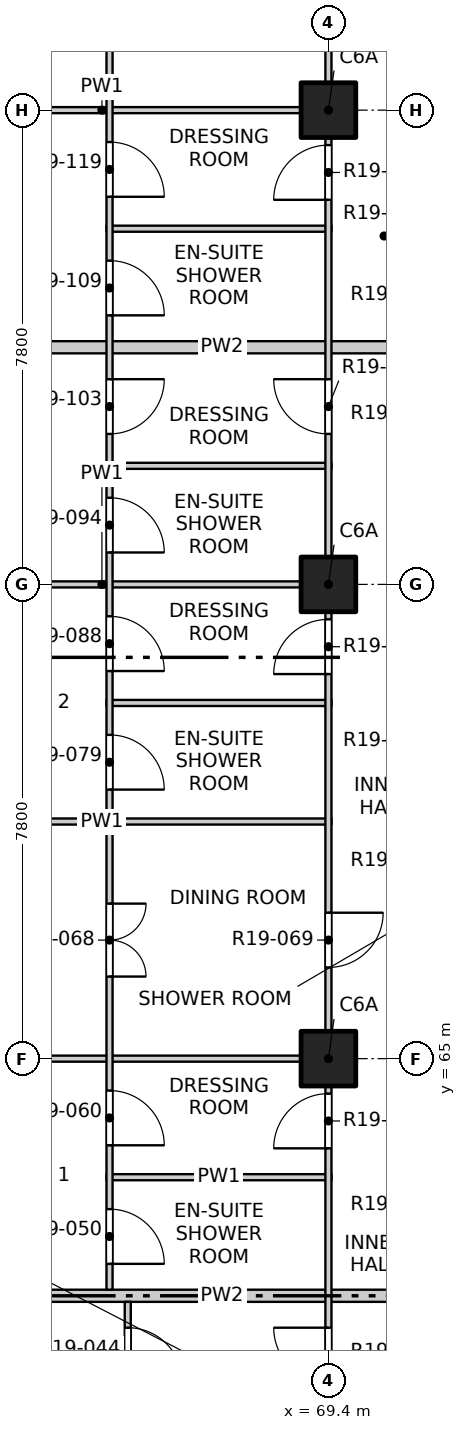
"""IFC4 building model, lengths in metres.
Left out: names, types, materials, properties, quantities, classifications, styles, units other than length and angle.
Written with IfcOpenShell. Run it as: python <this file> out.ifc"""

import sys

from ifc_helpers import new_model, si_unit, direction, frame, frame_2d, origin, origin_2d, place, context, subcontext, project, spatial, rectangle, extrude, element, fill, save


model = new_model("IFC4")
c1 = context("Model", 3, precision=1e-05, world=origin(), true_north=direction((0.0, 1.0)))
c2 = subcontext(c1, "Body", "Model", "MODEL_VIEW")
j1 = project(units=[si_unit("LENGTHUNIT", "METRE"), si_unit("PLANEANGLEUNIT", "RADIAN")], contexts=[c1])
p1 = place(None, origin())
s1 = spatial("IfcSite", under=j1, at=p1, CompositionType="ELEMENT")
p2 = place(p1, origin())
s2 = spatial("IfcBuilding", under=s1, at=p2, CompositionType="ELEMENT")
p3 = place(p2, frame((0.0, 0.0, 197.3)))
s3 = spatial("IfcBuildingStorey", under=s2, at=p3, CompositionType="ELEMENT", Elevation=197.3)
for number, where, z_axis, x_axis in (
    (1, (69.4, 65.0, -0.3), (0.0, 0.0, 1.0), (1.0, 0.0, 0.0)),
    (2, (69.4, 72.8, -0.3), (0.0, 0.0, 1.0), (1.0, 0.0, 0.0)),
    (3, (69.4, 80.6, -0.3), (0.0, 0.0, 1.0), (1.0, 0.0, 0.0)),
):
    element("IfcColumn", number, at=place(p3, frame(where, z_axis=z_axis, x_axis=x_axis)), inside=s3, PredefinedType="COLUMN", context=c2, shape_type="SweptSolid", body=[
        extrude(rectangle(XDim=0.9, YDim=0.9, at=origin_2d()), origin(), (0.0, 0.0, 1.0), 3.45),
    ])
p4 = place(p3, frame((61.9, 61.1, 0.0), z_axis=(0.0, 0.0, 1.0), x_axis=(1.0, 0.0, 0.0)))
e4 = element("IfcWall", 4, at=p4, inside=s3, PredefinedType="PARTITIONING", context=c2, shape_type="SweptSolid", body=[
    extrude(rectangle(XDim=11.5, YDim=0.2, at=frame_2d((5.75, 0.0))), origin(), (0.0, 0.0, 1.0), 2.55),
])
p5 = place(p3, frame((65.75, 63.05, 0.0), z_axis=(0.0, 0.0, 1.0), x_axis=(1.0, 0.0, 0.0)))
e5 = element("IfcWall", 5, at=p5, inside=s3, PredefinedType="PARTITIONING", context=c2, shape_type="SweptSolid", body=[
    extrude(rectangle(XDim=3.7, YDim=0.1, at=frame_2d((1.85, 0.0))), origin(), (0.0, 0.0, 1.0), 3.15),
])
p6 = place(p3, frame((61.9, 65.0, 0.0), z_axis=(0.0, 0.0, 1.0), x_axis=(1.0, 0.0, 0.0)))
e6 = element("IfcWall", 6, at=p6, inside=s3, PredefinedType="PARTITIONING", context=c2, shape_type="SweptSolid", body=[
    extrude(rectangle(XDim=7.55, YDim=0.1, at=frame_2d((3.775, 0.0))), origin(), (0.0, 0.0, 1.0), 3.15),
])
p7 = place(p3, frame((61.9, 68.9, 0.0), z_axis=(0.0, 0.0, 1.0), x_axis=(1.0, 0.0, 0.0)))
e7 = element("IfcWall", 7, at=p7, inside=s3, PredefinedType="PARTITIONING", context=c2, shape_type="SweptSolid", body=[
    extrude(rectangle(XDim=7.55, YDim=0.1, at=frame_2d((3.775, 0.0))), origin(), (0.0, 0.0, 1.0), 2.55),
])
p8 = place(p3, frame((65.75, 70.85, 0.0), z_axis=(0.0, 0.0, 1.0), x_axis=(1.0, 0.0, 0.0)))
e8 = element("IfcWall", 8, at=p8, inside=s3, PredefinedType="PARTITIONING", context=c2, shape_type="SweptSolid", body=[
    extrude(rectangle(XDim=3.7, YDim=0.1, at=frame_2d((1.85, 0.0))), origin(), (0.0, 0.0, 1.0), 3.15),
])
p9 = place(p3, frame((61.9, 72.8, 0.0), z_axis=(0.0, 0.0, 1.0), x_axis=(1.0, 0.0, 0.0)))
e9 = element("IfcWall", 9, at=p9, inside=s3, PredefinedType="PARTITIONING", context=c2, shape_type="SweptSolid", body=[
    extrude(rectangle(XDim=7.55, YDim=0.1, at=frame_2d((3.775, 0.0))), origin(), (0.0, 0.0, 1.0), 3.15),
])
p10 = place(p3, frame((65.75, 74.75, 0.0), z_axis=(0.0, 0.0, 1.0), x_axis=(1.0, 0.0, 0.0)))
e10 = element("IfcWall", 10, at=p10, inside=s3, PredefinedType="PARTITIONING", context=c2, shape_type="SweptSolid", body=[
    extrude(rectangle(XDim=3.7, YDim=0.1, at=frame_2d((1.85, 0.0))), origin(), (0.0, 0.0, 1.0), 3.15),
])
p11 = place(p3, frame((61.9, 76.7, 0.0), z_axis=(0.0, 0.0, 1.0), x_axis=(1.0, 0.0, 0.0)))
e11 = element("IfcWall", 11, at=p11, inside=s3, PredefinedType="PARTITIONING", context=c2, shape_type="SweptSolid", body=[
    extrude(rectangle(XDim=11.5, YDim=0.2, at=frame_2d((5.75, 0.0))), origin(), (0.0, 0.0, 1.0), 2.55),
])
p12 = place(p3, frame((65.75, 78.65, 0.0), z_axis=(0.0, 0.0, 1.0), x_axis=(1.0, 0.0, 0.0)))
e12 = element("IfcWall", 12, at=p12, inside=s3, PredefinedType="PARTITIONING", context=c2, shape_type="SweptSolid", body=[
    extrude(rectangle(XDim=3.7, YDim=0.1, at=frame_2d((1.85, 0.0))), origin(), (0.0, 0.0, 1.0), 3.15),
])
p13 = place(p3, frame((61.9, 80.6, 0.0), z_axis=(0.0, 0.0, 1.0), x_axis=(1.0, 0.0, 0.0)))
e13 = element("IfcWall", 13, at=p13, inside=s3, PredefinedType="PARTITIONING", context=c2, shape_type="SweptSolid", body=[
    extrude(rectangle(XDim=7.55, YDim=0.1, at=frame_2d((3.775, 0.0))), origin(), (0.0, 0.0, 1.0), 3.15),
])
p14 = place(p3, frame((65.8, 61.2, 0.0), z_axis=(0.0, 0.0, 1.0), x_axis=(0.0, 1.0, 0.0)))
e14 = element("IfcWall", 14, at=p14, inside=s3, PredefinedType="PARTITIONING", context=c2, shape_type="SweptSolid", body=[
    extrude(rectangle(XDim=26.9, YDim=0.1, at=frame_2d((13.45, 0.0))), origin(), (0.0, 0.0, 1.0), 3.15),
])
p15 = place(p14, frame((0.425, 0.0, 0.0)))
e15 = element("IfcOpeningElement", 15, at=p15, cuts=e14, PredefinedType="OPENING", context=c2, shape_type="SweptSolid", body=[
    extrude(rectangle(XDim=0.9, YDim=2.1, at=frame_2d((0.45, 1.05))), frame((0.0, 0.06, 0.0), z_axis=(0.0, -1.0, 0.0), x_axis=(1.0, 0.0, 0.0)), (0.0, 0.0, 1.0), 0.12),
])
p16 = place(p14, frame((2.375, 0.0, 0.0)))
e16 = element("IfcOpeningElement", 16, at=p16, cuts=e14, PredefinedType="OPENING", context=c2, shape_type="SweptSolid", body=[
    extrude(rectangle(XDim=0.9, YDim=2.1, at=frame_2d((0.45, 1.05))), frame((0.0, 0.06, 0.0), z_axis=(0.0, -1.0, 0.0), x_axis=(1.0, 0.0, 0.0)), (0.0, 0.0, 1.0), 0.12),
])
p17 = place(p14, frame((5.15, 0.0, 0.0)))
e17 = element("IfcOpeningElement", 17, at=p17, cuts=e14, PredefinedType="OPENING", context=c2, shape_type="SweptSolid", body=[
    extrude(rectangle(XDim=1.2, YDim=2.1, at=frame_2d((0.6, 1.05))), frame((0.0, 0.06, 0.0), z_axis=(0.0, -1.0, 0.0), x_axis=(1.0, 0.0, 0.0)), (0.0, 0.0, 1.0), 0.12),
])
p18 = place(p14, frame((8.225, 0.0, 0.0)))
e18 = element("IfcOpeningElement", 18, at=p18, cuts=e14, PredefinedType="OPENING", context=c2, shape_type="SweptSolid", body=[
    extrude(rectangle(XDim=0.9, YDim=2.1, at=frame_2d((0.45, 1.05))), frame((0.0, 0.06, 0.0), z_axis=(0.0, -1.0, 0.0), x_axis=(1.0, 0.0, 0.0)), (0.0, 0.0, 1.0), 0.12),
])
p19 = place(p14, frame((10.175, 0.0, 0.0)))
e19 = element("IfcOpeningElement", 19, at=p19, cuts=e14, PredefinedType="OPENING", context=c2, shape_type="SweptSolid", body=[
    extrude(rectangle(XDim=0.9, YDim=2.1, at=frame_2d((0.45, 1.05))), frame((0.0, 0.06, 0.0), z_axis=(0.0, -1.0, 0.0), x_axis=(1.0, 0.0, 0.0)), (0.0, 0.0, 1.0), 0.12),
])
p20 = place(p14, frame((12.125, 0.0, 0.0)))
e20 = element("IfcOpeningElement", 20, at=p20, cuts=e14, PredefinedType="OPENING", context=c2, shape_type="SweptSolid", body=[
    extrude(rectangle(XDim=0.9, YDim=2.1, at=frame_2d((0.45, 1.05))), frame((0.0, 0.06, 0.0), z_axis=(0.0, -1.0, 0.0), x_axis=(1.0, 0.0, 0.0)), (0.0, 0.0, 1.0), 0.12),
])
p21 = place(p14, frame((14.075, 0.0, 0.0)))
e21 = element("IfcOpeningElement", 21, at=p21, cuts=e14, PredefinedType="OPENING", context=c2, shape_type="SweptSolid", body=[
    extrude(rectangle(XDim=0.9, YDim=2.1, at=frame_2d((0.45, 1.05))), frame((0.0, 0.06, 0.0), z_axis=(0.0, -1.0, 0.0), x_axis=(1.0, 0.0, 0.0)), (0.0, 0.0, 1.0), 0.12),
])
p22 = place(p14, frame((16.025, 0.0, 0.0)))
e22 = element("IfcOpeningElement", 22, at=p22, cuts=e14, PredefinedType="OPENING", context=c2, shape_type="SweptSolid", body=[
    extrude(rectangle(XDim=0.9, YDim=2.1, at=frame_2d((0.45, 1.05))), frame((0.0, 0.06, 0.0), z_axis=(0.0, -1.0, 0.0), x_axis=(1.0, 0.0, 0.0)), (0.0, 0.0, 1.0), 0.12),
])
p23 = place(p14, frame((17.975, 0.0, 0.0)))
e23 = element("IfcOpeningElement", 23, at=p23, cuts=e14, PredefinedType="OPENING", context=c2, shape_type="SweptSolid", body=[
    extrude(rectangle(XDim=0.9, YDim=2.1, at=frame_2d((0.45, 1.05))), frame((0.0, 0.06, 0.0), z_axis=(0.0, -1.0, 0.0), x_axis=(1.0, 0.0, 0.0)), (0.0, 0.0, 1.0), 0.12),
])
p24 = place(p14, frame((20.75, 0.0, 0.0)))
e24 = element("IfcOpeningElement", 24, at=p24, cuts=e14, PredefinedType="OPENING", context=c2, shape_type="SweptSolid", body=[
    extrude(rectangle(XDim=1.2, YDim=2.1, at=frame_2d((0.6, 1.05))), frame((0.0, 0.06, 0.0), z_axis=(0.0, -1.0, 0.0), x_axis=(1.0, 0.0, 0.0)), (0.0, 0.0, 1.0), 0.12),
])
p25 = place(p14, frame((24.65, 0.0, 0.0)))
e25 = element("IfcOpeningElement", 25, at=p25, cuts=e14, PredefinedType="OPENING", context=c2, shape_type="SweptSolid", body=[
    extrude(rectangle(XDim=1.2, YDim=2.1, at=frame_2d((0.6, 1.05))), frame((0.0, 0.06, 0.0), z_axis=(0.0, -1.0, 0.0), x_axis=(1.0, 0.0, 0.0)), (0.0, 0.0, 1.0), 0.12),
])
p26 = place(p3, frame((66.1, 41.9, 0.0), z_axis=(0.0, 0.0, 1.0), x_axis=(0.0, 1.0, 0.0)))
e26 = element("IfcWall", 26, at=p26, inside=s3, PredefinedType="PARTITIONING", context=c2, shape_type="SweptSolid", body=[
    extrude(rectangle(XDim=19.1, YDim=0.1, at=frame_2d((9.55, 0.0))), origin(), (0.0, 0.0, 1.0), 3.15),
])
p27 = place(p26, frame((1.05, 0.0, 0.0)))
e27 = element("IfcOpeningElement", 27, at=p27, cuts=e26, PredefinedType="OPENING", context=c2, shape_type="SweptSolid", body=[
    extrude(rectangle(XDim=1.2, YDim=2.1, at=frame_2d((0.6, 1.05))), frame((0.0, 0.06, 0.0), z_axis=(0.0, -1.0, 0.0), x_axis=(1.0, 0.0, 0.0)), (0.0, 0.0, 1.0), 0.12),
])
p28 = place(p26, frame((4.95, 0.0, 0.0)))
e28 = element("IfcOpeningElement", 28, at=p28, cuts=e26, PredefinedType="OPENING", context=c2, shape_type="SweptSolid", body=[
    extrude(rectangle(XDim=1.2, YDim=2.1, at=frame_2d((0.6, 1.05))), frame((0.0, 0.06, 0.0), z_axis=(0.0, -1.0, 0.0), x_axis=(1.0, 0.0, 0.0)), (0.0, 0.0, 1.0), 0.12),
])
p29 = place(p26, frame((8.85, 0.0, 0.0)))
e29 = element("IfcOpeningElement", 29, at=p29, cuts=e26, PredefinedType="OPENING", context=c2, shape_type="SweptSolid", body=[
    extrude(rectangle(XDim=1.2, YDim=2.1, at=frame_2d((0.6, 1.05))), frame((0.0, 0.06, 0.0), z_axis=(0.0, -1.0, 0.0), x_axis=(1.0, 0.0, 0.0)), (0.0, 0.0, 1.0), 0.12),
])
p30 = place(p26, frame((11.925, 0.0, 0.0)))
e30 = element("IfcOpeningElement", 30, at=p30, cuts=e26, PredefinedType="OPENING", context=c2, shape_type="SweptSolid", body=[
    extrude(rectangle(XDim=0.9, YDim=2.1, at=frame_2d((0.45, 1.05))), frame((0.0, 0.06, 0.0), z_axis=(0.0, -1.0, 0.0), x_axis=(1.0, 0.0, 0.0)), (0.0, 0.0, 1.0), 0.12),
])
p31 = place(p26, frame((13.875, 0.0, 0.0)))
e31 = element("IfcOpeningElement", 31, at=p31, cuts=e26, PredefinedType="OPENING", context=c2, shape_type="SweptSolid", body=[
    extrude(rectangle(XDim=0.9, YDim=2.1, at=frame_2d((0.45, 1.05))), frame((0.0, 0.06, 0.0), z_axis=(0.0, -1.0, 0.0), x_axis=(1.0, 0.0, 0.0)), (0.0, 0.0, 1.0), 0.12),
])
p32 = place(p26, frame((15.825, 0.0, 0.0)))
e32 = element("IfcOpeningElement", 32, at=p32, cuts=e26, PredefinedType="OPENING", context=c2, shape_type="SweptSolid", body=[
    extrude(rectangle(XDim=0.9, YDim=2.1, at=frame_2d((0.45, 1.05))), frame((0.0, 0.06, 0.0), z_axis=(0.0, -1.0, 0.0), x_axis=(1.0, 0.0, 0.0)), (0.0, 0.0, 1.0), 0.12),
])
p33 = place(p26, frame((17.775, 0.0, 0.0)))
e33 = element("IfcOpeningElement", 33, at=p33, cuts=e26, PredefinedType="OPENING", context=c2, shape_type="SweptSolid", body=[
    extrude(rectangle(XDim=0.9, YDim=2.1, at=frame_2d((0.45, 1.05))), frame((0.0, 0.06, 0.0), z_axis=(0.0, -1.0, 0.0), x_axis=(1.0, 0.0, 0.0)), (0.0, 0.0, 1.0), 0.12),
])
p34 = place(p3, frame((69.4, 41.9, 0.0), z_axis=(0.0, 0.0, 1.0), x_axis=(0.0, 1.0, 0.0)))
e34 = element("IfcWall", 34, at=p34, inside=s3, PredefinedType="PARTITIONING", context=c2, shape_type="SweptSolid", body=[
    extrude(rectangle(XDim=46.2, YDim=0.1, at=frame_2d((23.1, 0.0))), origin(), (0.0, 0.0, 1.0), 3.15),
])
p35 = place(p34, frame((1.2, 0.0, 0.0)))
e35 = element("IfcOpeningElement", 35, at=p35, cuts=e34, PredefinedType="OPENING", context=c2, shape_type="SweptSolid", body=[
    extrude(rectangle(XDim=0.9, YDim=2.1, at=frame_2d((0.45, 1.05))), frame((0.0, 0.06, 0.0), z_axis=(0.0, -1.0, 0.0), x_axis=(1.0, 0.0, 0.0)), (0.0, 0.0, 1.0), 0.12),
])
p36 = place(p34, frame((5.1, 0.0, 0.0)))
e36 = element("IfcOpeningElement", 36, at=p36, cuts=e34, PredefinedType="OPENING", context=c2, shape_type="SweptSolid", body=[
    extrude(rectangle(XDim=0.9, YDim=2.1, at=frame_2d((0.45, 1.05))), frame((0.0, 0.06, 0.0), z_axis=(0.0, -1.0, 0.0), x_axis=(1.0, 0.0, 0.0)), (0.0, 0.0, 1.0), 0.12),
])
p37 = place(p34, frame((9.0, 0.0, 0.0)))
e37 = element("IfcOpeningElement", 37, at=p37, cuts=e34, PredefinedType="OPENING", context=c2, shape_type="SweptSolid", body=[
    extrude(rectangle(XDim=0.9, YDim=2.1, at=frame_2d((0.45, 1.05))), frame((0.0, 0.06, 0.0), z_axis=(0.0, -1.0, 0.0), x_axis=(1.0, 0.0, 0.0)), (0.0, 0.0, 1.0), 0.12),
])
p38 = place(p34, frame((13.85, 0.0, 0.0)))
e38 = element("IfcOpeningElement", 38, at=p38, cuts=e34, PredefinedType="OPENING", context=c2, shape_type="SweptSolid", body=[
    extrude(rectangle(XDim=0.9, YDim=2.1, at=frame_2d((0.45, 1.05))), frame((0.0, 0.06, 0.0), z_axis=(0.0, -1.0, 0.0), x_axis=(1.0, 0.0, 0.0)), (0.0, 0.0, 1.0), 0.12),
])
p39 = place(p34, frame((17.775, 0.0, 0.0)))
e39 = element("IfcOpeningElement", 39, at=p39, cuts=e34, PredefinedType="OPENING", context=c2, shape_type="SweptSolid", body=[
    extrude(rectangle(XDim=0.9, YDim=2.1, at=frame_2d((0.45, 1.05))), frame((0.0, 0.06, 0.0), z_axis=(0.0, -1.0, 0.0), x_axis=(1.0, 0.0, 0.0)), (0.0, 0.0, 1.0), 0.12),
])
p40 = place(p34, frame((21.625, 0.0, 0.0)))
e40 = element("IfcOpeningElement", 40, at=p40, cuts=e34, PredefinedType="OPENING", context=c2, shape_type="SweptSolid", body=[
    extrude(rectangle(XDim=0.9, YDim=2.1, at=frame_2d((0.45, 1.05))), frame((0.0, 0.06, 0.0), z_axis=(0.0, -1.0, 0.0), x_axis=(1.0, 0.0, 0.0)), (0.0, 0.0, 1.0), 0.12),
])
p41 = place(p34, frame((24.6, 0.0, 0.0)))
e41 = element("IfcOpeningElement", 41, at=p41, cuts=e34, PredefinedType="OPENING", context=c2, shape_type="SweptSolid", body=[
    extrude(rectangle(XDim=0.9, YDim=2.1, at=frame_2d((0.45, 1.05))), frame((0.0, 0.06, 0.0), z_axis=(0.0, -1.0, 0.0), x_axis=(1.0, 0.0, 0.0)), (0.0, 0.0, 1.0), 0.12),
])
p42 = place(p34, frame((29.425, 0.0, 0.0)))
e42 = element("IfcOpeningElement", 42, at=p42, cuts=e34, PredefinedType="OPENING", context=c2, shape_type="SweptSolid", body=[
    extrude(rectangle(XDim=0.9, YDim=2.1, at=frame_2d((0.45, 1.05))), frame((0.0, 0.06, 0.0), z_axis=(0.0, -1.0, 0.0), x_axis=(1.0, 0.0, 0.0)), (0.0, 0.0, 1.0), 0.12),
])
p43 = place(p34, frame((33.375, 0.0, 0.0)))
e43 = element("IfcOpeningElement", 43, at=p43, cuts=e34, PredefinedType="OPENING", context=c2, shape_type="SweptSolid", body=[
    extrude(rectangle(XDim=0.9, YDim=2.1, at=frame_2d((0.45, 1.05))), frame((0.0, 0.06, 0.0), z_axis=(0.0, -1.0, 0.0), x_axis=(1.0, 0.0, 0.0)), (0.0, 0.0, 1.0), 0.12),
])
p44 = place(p34, frame((37.225, 0.0, 0.0)))
e44 = element("IfcOpeningElement", 44, at=p44, cuts=e34, PredefinedType="OPENING", context=c2, shape_type="SweptSolid", body=[
    extrude(rectangle(XDim=0.9, YDim=2.1, at=frame_2d((0.45, 1.05))), frame((0.0, 0.06, 0.0), z_axis=(0.0, -1.0, 0.0), x_axis=(1.0, 0.0, 0.0)), (0.0, 0.0, 1.0), 0.12),
])
p45 = place(p34, frame((40.2, 0.0, 0.0)))
e45 = element("IfcOpeningElement", 45, at=p45, cuts=e34, PredefinedType="OPENING", context=c2, shape_type="SweptSolid", body=[
    extrude(rectangle(XDim=0.9, YDim=2.1, at=frame_2d((0.45, 1.05))), frame((0.0, 0.06, 0.0), z_axis=(0.0, -1.0, 0.0), x_axis=(1.0, 0.0, 0.0)), (0.0, 0.0, 1.0), 0.12),
])
p46 = place(p34, frame((44.1, 0.0, 0.0)))
e46 = element("IfcOpeningElement", 46, at=p46, cuts=e34, PredefinedType="OPENING", context=c2, shape_type="SweptSolid", body=[
    extrude(rectangle(XDim=0.9, YDim=2.1, at=frame_2d((0.45, 1.05))), frame((0.0, 0.06, 0.0), z_axis=(0.0, -1.0, 0.0), x_axis=(1.0, 0.0, 0.0)), (0.0, 0.0, 1.0), 0.12),
])
p47 = place(p33, origin())
e47 = element("IfcDoor", 47, at=p47, inside=s3, OperationType="SINGLE_SWING_RIGHT", PredefinedType="DOOR", context=c2, shape_type="SweptSolid", body=[
    extrude(rectangle(XDim=0.9, YDim=2.1, at=frame_2d((0.45, 1.05))), frame((0.0, 0.025, 0.0), z_axis=(0.0, -1.0, 0.0), x_axis=(1.0, 0.0, 0.0)), (0.0, 0.0, 1.0), 0.05),
])
fill(e33, e47)
p48 = place(p39, origin())
e48 = element("IfcDoor", 48, at=p48, inside=s3, OperationType="SINGLE_SWING_RIGHT", PredefinedType="DOOR", context=c2, shape_type="SweptSolid", body=[
    extrude(rectangle(XDim=0.9, YDim=2.1, at=frame_2d((0.45, 1.05))), frame((0.0, 0.025, 0.0), z_axis=(0.0, -1.0, 0.0), x_axis=(1.0, 0.0, 0.0)), (0.0, 0.0, 1.0), 0.05),
])
fill(e39, e48)
p49 = place(p15, origin())
e49 = element("IfcDoor", 49, at=p49, inside=s3, OperationType="SINGLE_SWING_RIGHT", PredefinedType="DOOR", context=c2, shape_type="SweptSolid", body=[
    extrude(rectangle(XDim=0.9, YDim=2.1, at=frame_2d((0.45, 1.05))), frame((0.0, 0.025, 0.0), z_axis=(0.0, -1.0, 0.0), x_axis=(1.0, 0.0, 0.0)), (0.0, 0.0, 1.0), 0.05),
])
fill(e15, e49)
p50 = place(p40, origin())
e50 = element("IfcDoor", 50, at=p50, inside=s3, OperationType="SINGLE_SWING_LEFT", PredefinedType="DOOR", context=c2, shape_type="SweptSolid", body=[
    extrude(rectangle(XDim=0.9, YDim=2.1, at=frame_2d((0.45, 1.05))), frame((0.0, 0.025, 0.0), z_axis=(0.0, -1.0, 0.0), x_axis=(1.0, 0.0, 0.0)), (0.0, 0.0, 1.0), 0.05),
])
fill(e40, e50)
p51 = place(p16, origin())
e51 = element("IfcDoor", 51, at=p51, inside=s3, OperationType="SINGLE_SWING_RIGHT", PredefinedType="DOOR", context=c2, shape_type="SweptSolid", body=[
    extrude(rectangle(XDim=0.9, YDim=2.1, at=frame_2d((0.45, 1.05))), frame((0.0, 0.025, 0.0), z_axis=(0.0, -1.0, 0.0), x_axis=(1.0, 0.0, 0.0)), (0.0, 0.0, 1.0), 0.05),
])
fill(e16, e51)
p52 = place(p17, origin())
e52 = element("IfcDoor", 52, at=p52, inside=s3, OperationType="DOUBLE_DOOR_SINGLE_SWING", PredefinedType="DOOR", context=c2, shape_type="SweptSolid", body=[
    extrude(rectangle(XDim=1.2, YDim=2.1, at=frame_2d((0.6, 1.05))), frame((0.0, 0.025, 0.0), z_axis=(0.0, -1.0, 0.0), x_axis=(1.0, 0.0, 0.0)), (0.0, 0.0, 1.0), 0.05),
])
fill(e17, e52)
p53 = place(p41, origin())
e53 = element("IfcDoor", 53, at=p53, inside=s3, OperationType="SINGLE_SWING_LEFT", PredefinedType="DOOR", context=c2, shape_type="SweptSolid", body=[
    extrude(rectangle(XDim=0.9, YDim=2.1, at=frame_2d((0.45, 1.05))), frame((0.0, 0.025, 0.0), z_axis=(0.0, -1.0, 0.0), x_axis=(1.0, 0.0, 0.0)), (0.0, 0.0, 1.0), 0.05),
])
fill(e41, e53)
p54 = place(p18, origin())
e54 = element("IfcDoor", 54, at=p54, inside=s3, OperationType="SINGLE_SWING_RIGHT", PredefinedType="DOOR", context=c2, shape_type="SweptSolid", body=[
    extrude(rectangle(XDim=0.9, YDim=2.1, at=frame_2d((0.45, 1.05))), frame((0.0, 0.025, 0.0), z_axis=(0.0, -1.0, 0.0), x_axis=(1.0, 0.0, 0.0)), (0.0, 0.0, 1.0), 0.05),
])
fill(e18, e54)
p55 = place(p42, origin())
e55 = element("IfcDoor", 55, at=p55, inside=s3, OperationType="SINGLE_SWING_LEFT", PredefinedType="DOOR", context=c2, shape_type="SweptSolid", body=[
    extrude(rectangle(XDim=0.9, YDim=2.1, at=frame_2d((0.45, 1.05))), frame((0.0, 0.025, 0.0), z_axis=(0.0, -1.0, 0.0), x_axis=(1.0, 0.0, 0.0)), (0.0, 0.0, 1.0), 0.05),
])
fill(e42, e55)
p56 = place(p19, origin())
e56 = element("IfcDoor", 56, at=p56, inside=s3, OperationType="SINGLE_SWING_RIGHT", PredefinedType="DOOR", context=c2, shape_type="SweptSolid", body=[
    extrude(rectangle(XDim=0.9, YDim=2.1, at=frame_2d((0.45, 1.05))), frame((0.0, 0.025, 0.0), z_axis=(0.0, -1.0, 0.0), x_axis=(1.0, 0.0, 0.0)), (0.0, 0.0, 1.0), 0.05),
])
fill(e19, e56)
p57 = place(p20, origin())
e57 = element("IfcDoor", 57, at=p57, inside=s3, OperationType="SINGLE_SWING_RIGHT", PredefinedType="DOOR", context=c2, shape_type="SweptSolid", body=[
    extrude(rectangle(XDim=0.9, YDim=2.1, at=frame_2d((0.45, 1.05))), frame((0.0, 0.025, 0.0), z_axis=(0.0, -1.0, 0.0), x_axis=(1.0, 0.0, 0.0)), (0.0, 0.0, 1.0), 0.05),
])
fill(e20, e57)
p58 = place(p21, origin())
e58 = element("IfcDoor", 58, at=p58, inside=s3, OperationType="SINGLE_SWING_LEFT", PredefinedType="DOOR", context=c2, shape_type="SweptSolid", body=[
    extrude(rectangle(XDim=0.9, YDim=2.1, at=frame_2d((0.45, 1.05))), frame((0.0, 0.025, 0.0), z_axis=(0.0, -1.0, 0.0), x_axis=(1.0, 0.0, 0.0)), (0.0, 0.0, 1.0), 0.05),
])
fill(e21, e58)
p59 = place(p43, origin())
e59 = element("IfcDoor", 59, at=p59, inside=s3, OperationType="SINGLE_SWING_RIGHT", PredefinedType="DOOR", context=c2, shape_type="SweptSolid", body=[
    extrude(rectangle(XDim=0.9, YDim=2.1, at=frame_2d((0.45, 1.05))), frame((0.0, 0.025, 0.0), z_axis=(0.0, -1.0, 0.0), x_axis=(1.0, 0.0, 0.0)), (0.0, 0.0, 1.0), 0.05),
])
fill(e43, e59)
p60 = place(p22, origin())
e60 = element("IfcDoor", 60, at=p60, inside=s3, OperationType="SINGLE_SWING_RIGHT", PredefinedType="DOOR", context=c2, shape_type="SweptSolid", body=[
    extrude(rectangle(XDim=0.9, YDim=2.1, at=frame_2d((0.45, 1.05))), frame((0.0, 0.025, 0.0), z_axis=(0.0, -1.0, 0.0), x_axis=(1.0, 0.0, 0.0)), (0.0, 0.0, 1.0), 0.05),
])
fill(e22, e60)
p61 = place(p44, origin())
e61 = element("IfcDoor", 61, at=p61, inside=s3, OperationType="SINGLE_SWING_LEFT", PredefinedType="DOOR", context=c2, shape_type="SweptSolid", body=[
    extrude(rectangle(XDim=0.9, YDim=2.1, at=frame_2d((0.45, 1.05))), frame((0.0, 0.025, 0.0), z_axis=(0.0, -1.0, 0.0), x_axis=(1.0, 0.0, 0.0)), (0.0, 0.0, 1.0), 0.05),
])
fill(e44, e61)
p62 = place(p23, origin())
e62 = element("IfcDoor", 62, at=p62, inside=s3, OperationType="SINGLE_SWING_RIGHT", PredefinedType="DOOR", context=c2, shape_type="SweptSolid", body=[
    extrude(rectangle(XDim=0.9, YDim=2.1, at=frame_2d((0.45, 1.05))), frame((0.0, 0.025, 0.0), z_axis=(0.0, -1.0, 0.0), x_axis=(1.0, 0.0, 0.0)), (0.0, 0.0, 1.0), 0.05),
])
fill(e23, e62)
save(model, sys.argv[1])
